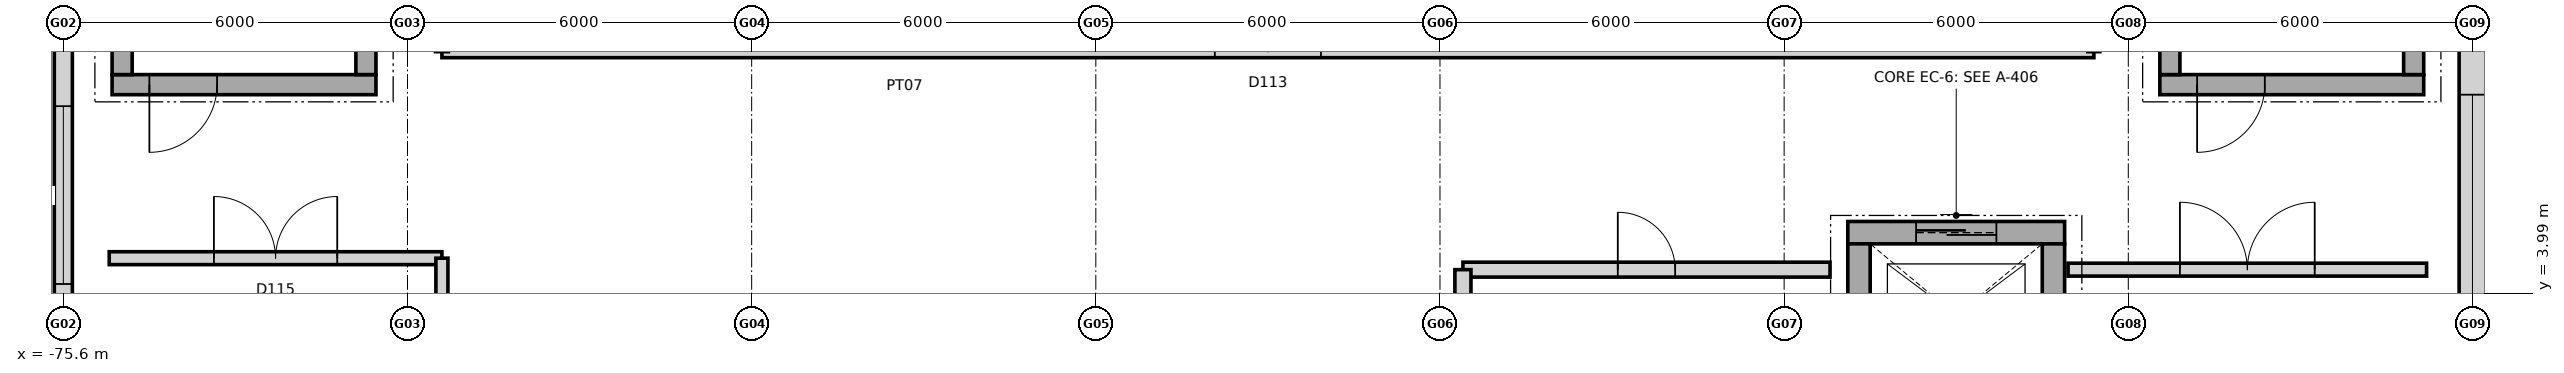
"""IFC4 building model, lengths in metres.
Left out: names, types, materials, properties, quantities, classifications, styles, units other than length and angle.
Written with IfcOpenShell. Run it as: python <this file> out.ifc"""

import sys

from ifc_helpers import new_model, si_unit, direction, frame, frame_2d, origin, place, context, subcontext, project, spatial, rectangle, extrude, element, fill, save


model = new_model("IFC4")
c1 = context("Model", 3, precision=1e-05, world=origin(), true_north=direction((0.0, 1.0)))
c2 = subcontext(c1, "Body", "Model", "MODEL_VIEW")
j1 = project(units=[si_unit("LENGTHUNIT", "METRE"), si_unit("PLANEANGLEUNIT", "RADIAN")], contexts=[c1])
p1 = place(None, origin())
s1 = spatial("IfcSite", under=j1, at=p1, CompositionType="ELEMENT")
p2 = place(p1, origin())
s2 = spatial("IfcBuilding", under=s1, at=p2, CompositionType="ELEMENT")
p3 = place(p2, frame((0.0, 0.0, 5.4)))
s3 = spatial("IfcBuildingStorey", under=s2, at=p3, CompositionType="ELEMENT", Elevation=5.4)
p4 = place(p3, frame((-75.6, 1.648, 0.0), z_axis=(0.0, 0.0, 1.0), x_axis=(0.0, 1.0, 0.0)))
e1 = element("IfcWall", 1, at=p4, inside=s3, PredefinedType="STANDARD", context=c2, shape_type="SweptSolid", body=[
    extrude(rectangle(XDim=8.104, YDim=0.315, at=frame_2d((4.052, 0.0))), origin(), (0.0, 0.0, 1.0), 3.824),
])
p5 = place(p4, frame((2.502, 0.0, 0.85)))
e2 = element("IfcOpeningElement", 2, at=p5, cuts=e1, PredefinedType="OPENING", context=c2, shape_type="SweptSolid", body=[
    extrude(rectangle(XDim=3.1, YDim=2.1, at=frame_2d((1.55, 1.05))), frame((0.0, 0.167, 0.0), z_axis=(0.0, -1.0, 0.0), x_axis=(1.0, 0.0, 0.0)), (0.0, 0.0, 1.0), 0.335),
])
p6 = place(p3, frame((-33.6, 9.752, 0.0), z_axis=(0.0, 0.0, 1.0), x_axis=(0.0, -1.0, 0.0)))
e3 = element("IfcWall", 3, at=p6, inside=s3, PredefinedType="STANDARD", context=c2, shape_type="SweptSolid", body=[
    extrude(rectangle(XDim=8.104, YDim=0.465, at=frame_2d((4.052, 0.0))), origin(), (0.0, 0.0, 1.0), 3.824),
])
p7 = place(p6, frame((2.302, 0.0, 0.85)))
e4 = element("IfcOpeningElement", 4, at=p7, cuts=e3, PredefinedType="OPENING", context=c2, shape_type="SweptSolid", body=[
    extrude(rectangle(XDim=3.5, YDim=1.45, at=frame_2d((1.75, 0.725))), frame((0.0, 0.242, 0.0), z_axis=(0.0, -1.0, 0.0), x_axis=(1.0, 0.0, 0.0)), (0.0, 0.0, 1.0), 0.485),
])
p8 = place(p3, frame((-70.15, 7.625, 0.0), z_axis=(0.0, 0.0, 1.0), x_axis=(-1.0, 0.0, 0.0)))
e5 = element("IfcWall", 5, at=p8, inside=s3, PredefinedType="SHEAR", context=c2, shape_type="SweptSolid", body=[
    extrude(rectangle(XDim=4.6, YDim=0.35, at=frame_2d((2.3, 0.0))), origin(), (0.0, 0.0, 1.0), 4.8),
])
p9 = place(p8, frame((2.77, 0.0, 0.0)))
e6 = element("IfcOpeningElement", 6, at=p9, cuts=e5, PredefinedType="OPENING", context=c2, shape_type="SweptSolid", body=[
    extrude(rectangle(XDim=1.18, YDim=2.15, at=frame_2d((0.59, 1.075))), frame((0.0, 0.185, 0.0), z_axis=(0.0, -1.0, 0.0), x_axis=(1.0, 0.0, 0.0)), (0.0, 0.0, 1.0), 0.37),
])
for number, where, z_axis, x_axis in (
    (7, (-74.575, 7.8, 0.0), (0.0, 0.0, 1.0), (0.0, 1.0, 0.0)),
    (8, (-70.325, 16.1, 0.0), (0.0, 0.0, 1.0), (0.0, -1.0, 0.0)),
):
    element("IfcWall", number, at=place(p3, frame(where, z_axis=z_axis, x_axis=x_axis)), inside=s3, PredefinedType="SHEAR", context=c2, shape_type="SweptSolid", body=[
        extrude(rectangle(XDim=8.3, YDim=0.35, at=frame_2d((4.15, 0.0))), origin(), (0.0, 0.0, 1.0), 4.8),
    ])
p10 = place(p3, frame((-34.45, 7.625, 0.0), z_axis=(0.0, 0.0, 1.0), x_axis=(-1.0, 0.0, 0.0)))
e9 = element("IfcWall", 9, at=p10, inside=s3, PredefinedType="SHEAR", context=c2, shape_type="SweptSolid", body=[
    extrude(rectangle(XDim=4.6, YDim=0.35, at=frame_2d((2.3, 0.0))), origin(), (0.0, 0.0, 1.0), 4.8),
])
p11 = place(p10, frame((2.77, 0.0, 0.0)))
e10 = element("IfcOpeningElement", 10, at=p11, cuts=e9, PredefinedType="OPENING", context=c2, shape_type="SweptSolid", body=[
    extrude(rectangle(XDim=1.18, YDim=2.15, at=frame_2d((0.59, 1.075))), frame((0.0, 0.185, 0.0), z_axis=(0.0, -1.0, 0.0), x_axis=(1.0, 0.0, 0.0)), (0.0, 0.0, 1.0), 0.37),
])
for number, where, z_axis, x_axis in (
    (11, (-38.875, 7.8, 0.0), (0.0, 0.0, 1.0), (0.0, 1.0, 0.0)),
    (12, (-34.625, 16.1, 0.0), (0.0, 0.0, 1.0), (0.0, -1.0, 0.0)),
):
    element("IfcWall", number, at=place(p3, frame(where, z_axis=z_axis, x_axis=x_axis)), inside=s3, PredefinedType="SHEAR", context=c2, shape_type="SweptSolid", body=[
        extrude(rectangle(XDim=8.3, YDim=0.35, at=frame_2d((4.15, 0.0))), origin(), (0.0, 0.0, 1.0), 4.8),
    ])
p12 = place(p3, frame((-44.49, 5.045, 0.0), z_axis=(0.0, 0.0, 1.0), x_axis=(1.0, 0.0, 0.0)))
e13 = element("IfcWall", 13, at=p12, inside=s3, PredefinedType="SHEAR", context=c2, shape_type="SweptSolid", body=[
    extrude(rectangle(XDim=3.78, YDim=0.39, at=frame_2d((1.89, 0.0))), origin(), (0.0, 0.0, 1.0), 4.8),
])
p13 = place(p12, frame((1.19, 0.0, 0.0)))
e14 = element("IfcOpeningElement", 14, at=p13, cuts=e13, PredefinedType="OPENING", context=c2, shape_type="SweptSolid", body=[
    extrude(rectangle(XDim=1.4, YDim=2.2, at=frame_2d((0.7, 1.1))), frame((0.0, 0.205, 0.0), z_axis=(0.0, -1.0, 0.0), x_axis=(1.0, 0.0, 0.0)), (0.0, 0.0, 1.0), 0.41),
])
for number, where, z_axis, x_axis in (
    (15, (-44.295, 2.35, 0.0), (0.0, 0.0, 1.0), (0.0, 1.0, 0.0)),
    (16, (-40.905, 4.85, 0.0), (0.0, 0.0, 1.0), (0.0, -1.0, 0.0)),
):
    element("IfcWall", number, at=place(p3, frame(where, z_axis=z_axis, x_axis=x_axis)), inside=s3, PredefinedType="SHEAR", context=c2, shape_type="SweptSolid", body=[
        extrude(rectangle(XDim=2.5, YDim=0.39, at=frame_2d((1.25, 0.0))), origin(), (0.0, 0.0, 1.0), 4.8),
    ])
p14 = place(p3, frame((-69.0, 8.2, 0.0), z_axis=(0.0, 0.0, 1.0), x_axis=(1.0, 0.0, 0.0)))
e17 = element("IfcWall", 17, at=p14, inside=s3, PredefinedType="PARTITIONING", context=c2, shape_type="SweptSolid", body=[
    extrude(rectangle(XDim=28.8, YDim=0.21, at=frame_2d((14.4, 0.0))), origin(), (0.0, 0.0, 1.0), 4.42),
])
p15 = place(p14, frame((13.475, 0.0, 0.0)))
e18 = element("IfcOpeningElement", 18, at=p15, cuts=e17, PredefinedType="OPENING", context=c2, shape_type="SweptSolid", body=[
    extrude(rectangle(XDim=1.85, YDim=2.3, at=frame_2d((0.925, 1.15))), frame((0.0, 0.115, 0.0), z_axis=(0.0, -1.0, 0.0), x_axis=(1.0, 0.0, 0.0)), (0.0, 0.0, 1.0), 0.23),
])
p16 = place(p3, frame((-51.2, 4.4, 0.0), z_axis=(0.0, 0.0, 1.0), x_axis=(1.0, 0.0, 0.0)))
e19 = element("IfcWall", 19, at=p16, inside=s3, PredefinedType="PARTITIONING", context=c2, shape_type="SweptSolid", body=[
    extrude(rectangle(XDim=6.4, YDim=0.26, at=frame_2d((3.2, 0.0))), origin(), (0.0, 0.0, 1.0), 4.42),
])
p17 = place(p16, frame((2.7, 0.0, 0.0)))
e20 = element("IfcOpeningElement", 20, at=p17, cuts=e19, PredefinedType="OPENING", context=c2, shape_type="SweptSolid", body=[
    extrude(rectangle(XDim=1.0, YDim=2.25, at=frame_2d((0.5, 1.125))), frame((0.0, 0.14, 0.0), z_axis=(0.0, -1.0, 0.0), x_axis=(1.0, 0.0, 0.0)), (0.0, 0.0, 1.0), 0.28),
])
p18 = place(p3, frame((-51.2, -16.0, 0.0), z_axis=(0.0, 0.0, 1.0), x_axis=(0.0, 1.0, 0.0)))
e21 = element("IfcWall", 21, at=p18, inside=s3, PredefinedType="PARTITIONING", context=c2, shape_type="SweptSolid", body=[
    extrude(rectangle(XDim=20.4, YDim=0.28, at=frame_2d((10.2, 0.0))), origin(), (0.0, 0.0, 1.0), 3.685),
])
p19 = place(p3, frame((-74.8, 4.6, 0.0), z_axis=(0.0, 0.0, 1.0), x_axis=(1.0, 0.0, 0.0)))
e22 = element("IfcWall", 22, at=p19, inside=s3, PredefinedType="PARTITIONING", context=c2, shape_type="SweptSolid", body=[
    extrude(rectangle(XDim=5.8, YDim=0.225, at=frame_2d((2.9, 0.0))), origin(), (0.0, 0.0, 1.0), 4.42),
])
p20 = place(p19, frame((1.825, 0.0, 0.0)))
e23 = element("IfcOpeningElement", 23, at=p20, cuts=e22, PredefinedType="OPENING", context=c2, shape_type="SweptSolid", body=[
    extrude(rectangle(XDim=2.15, YDim=2.4, at=frame_2d((1.075, 1.2))), frame((0.0, 0.123, 0.0), z_axis=(0.0, -1.0, 0.0), x_axis=(1.0, 0.0, 0.0)), (0.0, 0.0, 1.0), 0.245),
])
p21 = place(p3, frame((-69.0, -16.0, 0.0), z_axis=(0.0, 0.0, 1.0), x_axis=(0.0, 1.0, 0.0)))
e24 = element("IfcWall", 24, at=p21, inside=s3, PredefinedType="PARTITIONING", context=c2, shape_type="SweptSolid", body=[
    extrude(rectangle(XDim=20.6, YDim=0.21, at=frame_2d((10.3, 0.0))), origin(), (0.0, 0.0, 1.0), 4.42),
])
p22 = place(p3, frame((-40.65, 4.4, 0.0), z_axis=(0.0, 0.0, 1.0), x_axis=(1.0, 0.0, 0.0)))
e25 = element("IfcWall", 25, at=p22, inside=s3, PredefinedType="PARTITIONING", context=c2, shape_type="SweptSolid", body=[
    extrude(rectangle(XDim=6.25, YDim=0.225, at=frame_2d((3.125, 0.0))), origin(), (0.0, 0.0, 1.0), 4.42),
])
p23 = place(p22, frame((1.95, 0.0, 0.0)))
e26 = element("IfcOpeningElement", 26, at=p23, cuts=e25, PredefinedType="OPENING", context=c2, shape_type="SweptSolid", body=[
    extrude(rectangle(XDim=2.35, YDim=2.5, at=frame_2d((1.175, 1.25))), frame((0.0, 0.123, 0.0), z_axis=(0.0, -1.0, 0.0), x_axis=(1.0, 0.0, 0.0)), (0.0, 0.0, 1.0), 0.245),
])
p24 = place(p5, origin())
e27 = element("IfcWindow", 27, at=p24, inside=s3, PartitioningType="SINGLE_PANEL", PredefinedType="WINDOW", context=c2, shape_type="SweptSolid", body=[
    extrude(rectangle(XDim=3.1, YDim=2.1, at=frame_2d((1.55, 1.05))), frame((0.0, 0.03, 0.0), z_axis=(0.0, -1.0, 0.0), x_axis=(1.0, 0.0, 0.0)), (0.0, 0.0, 1.0), 0.06),
])
fill(e2, e27)
p25 = place(p7, origin())
e28 = element("IfcWindow", 28, at=p25, inside=s3, PartitioningType="SINGLE_PANEL", PredefinedType="WINDOW", context=c2, shape_type="SweptSolid", body=[
    extrude(rectangle(XDim=3.5, YDim=1.45, at=frame_2d((1.75, 0.725))), frame((0.0, 0.03, 0.0), z_axis=(0.0, -1.0, 0.0), x_axis=(1.0, 0.0, 0.0)), (0.0, 0.0, 1.0), 0.06),
])
fill(e4, e28)
p26 = place(p9, origin())
e29 = element("IfcDoor", 29, at=p26, inside=s3, OperationType="SINGLE_SWING_RIGHT", PredefinedType="DOOR", context=c2, shape_type="SweptSolid", body=[
    extrude(rectangle(XDim=1.18, YDim=2.15, at=frame_2d((0.59, 1.075))), frame((0.0, 0.025, 0.0), z_axis=(0.0, -1.0, 0.0), x_axis=(1.0, 0.0, 0.0)), (0.0, 0.0, 1.0), 0.05),
])
fill(e6, e29)
p27 = place(p11, origin())
e30 = element("IfcDoor", 30, at=p27, inside=s3, OperationType="SINGLE_SWING_RIGHT", PredefinedType="DOOR", context=c2, shape_type="SweptSolid", body=[
    extrude(rectangle(XDim=1.18, YDim=2.15, at=frame_2d((0.59, 1.075))), frame((0.0, 0.025, 0.0), z_axis=(0.0, -1.0, 0.0), x_axis=(1.0, 0.0, 0.0)), (0.0, 0.0, 1.0), 0.05),
])
fill(e10, e30)
p28 = place(p13, origin())
e31 = element("IfcDoor", 31, at=p28, inside=s3, OperationType="SLIDING_TO_LEFT", PredefinedType="DOOR", context=c2, shape_type="SweptSolid", body=[
    extrude(rectangle(XDim=1.4, YDim=2.2, at=frame_2d((0.7, 1.1))), frame((0.0, 0.025, 0.0), z_axis=(0.0, -1.0, 0.0), x_axis=(1.0, 0.0, 0.0)), (0.0, 0.0, 1.0), 0.05),
])
fill(e14, e31)
p29 = place(p15, origin())
e32 = element("IfcDoor", 32, at=p29, inside=s3, OperationType="DOUBLE_DOOR_SINGLE_SWING", PredefinedType="DOOR", context=c2, shape_type="SweptSolid", body=[
    extrude(rectangle(XDim=1.85, YDim=2.3, at=frame_2d((0.925, 1.15))), frame((0.0, 0.025, 0.0), z_axis=(0.0, -1.0, 0.0), x_axis=(1.0, 0.0, 0.0)), (0.0, 0.0, 1.0), 0.05),
])
fill(e18, e32)
p30 = place(p17, origin())
e33 = element("IfcDoor", 33, at=p30, inside=s3, OperationType="SINGLE_SWING_LEFT", PredefinedType="DOOR", context=c2, shape_type="SweptSolid", body=[
    extrude(rectangle(XDim=1.0, YDim=2.25, at=frame_2d((0.5, 1.125))), frame((0.0, 0.025, 0.0), z_axis=(0.0, -1.0, 0.0), x_axis=(1.0, 0.0, 0.0)), (0.0, 0.0, 1.0), 0.05),
])
fill(e20, e33)
p31 = place(p20, origin())
e34 = element("IfcDoor", 34, at=p31, inside=s3, OperationType="DOUBLE_DOOR_SINGLE_SWING", PredefinedType="DOOR", context=c2, shape_type="SweptSolid", body=[
    extrude(rectangle(XDim=2.15, YDim=2.4, at=frame_2d((1.075, 1.2))), frame((0.0, 0.025, 0.0), z_axis=(0.0, -1.0, 0.0), x_axis=(1.0, 0.0, 0.0)), (0.0, 0.0, 1.0), 0.05),
])
fill(e23, e34)
p32 = place(p23, origin())
e35 = element("IfcDoor", 35, at=p32, inside=s3, OperationType="DOUBLE_DOOR_SINGLE_SWING", PredefinedType="DOOR", context=c2, shape_type="SweptSolid", body=[
    extrude(rectangle(XDim=2.35, YDim=2.5, at=frame_2d((1.175, 1.25))), frame((0.0, 0.025, 0.0), z_axis=(0.0, -1.0, 0.0), x_axis=(1.0, 0.0, 0.0)), (0.0, 0.0, 1.0), 0.05),
])
fill(e26, e35)
save(model, sys.argv[1])
